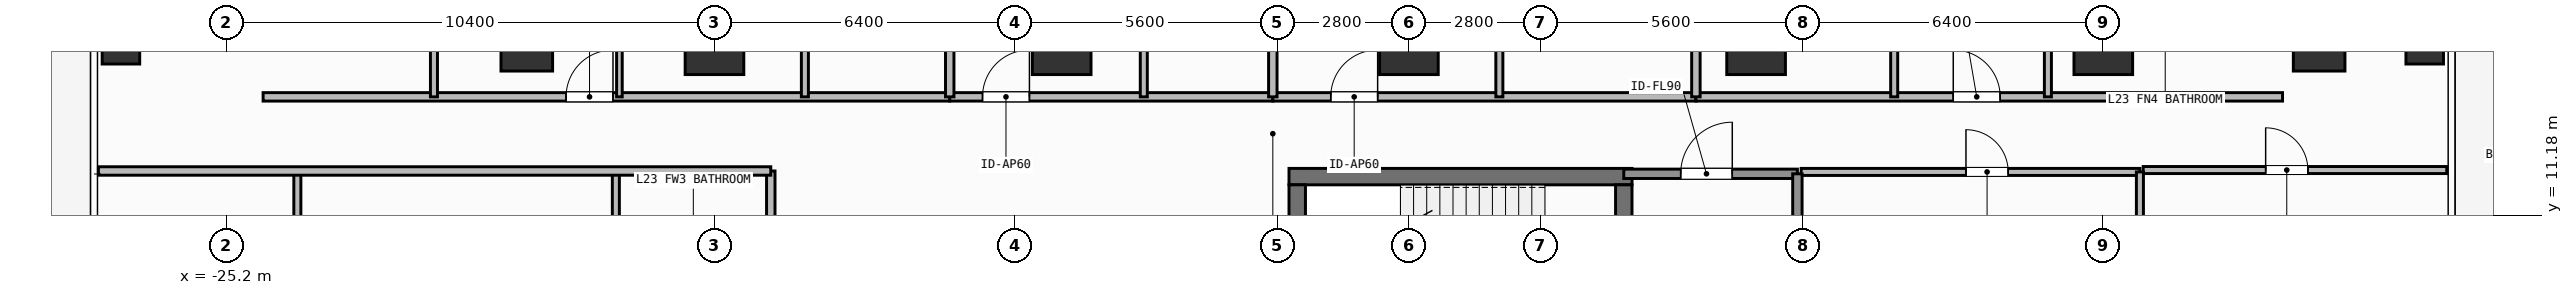
"""IFC4 building model, lengths in metres.
Left out: names, types, materials, properties, quantities, classifications, styles, units other than length and angle.
Written with IfcOpenShell. Run it as: python <this file> out.ifc"""

import sys

from ifc_helpers import new_model, si_unit, direction, frame, frame_2d, origin, origin_2d, place, context, subcontext, project, spatial, rectangle, hollow_rectangle, extrude, element, fill, save


model = new_model("IFC4")
c1 = context("Model", 3, precision=1e-05, world=origin(), true_north=direction((0.0, 1.0)))
c2 = subcontext(c1, "Body", "Model", "MODEL_VIEW")
j1 = project(units=[si_unit("LENGTHUNIT", "METRE"), si_unit("PLANEANGLEUNIT", "RADIAN")], contexts=[c1])
p1 = place(None, origin())
s1 = spatial("IfcSite", under=j1, at=p1, CompositionType="ELEMENT")
p2 = place(p1, origin())
s2 = spatial("IfcBuilding", under=s1, at=p2, CompositionType="ELEMENT")
p3 = place(p2, frame((0.0, 0.0, 93.0)))
s3 = spatial("IfcBuildingStorey", under=s2, at=p3, CompositionType="ELEMENT", Elevation=93.0)
p4 = place(p3, frame((-2.555, 12.0, 0.0), z_axis=(0.0, 0.0, 1.0), x_axis=(1.0, 0.0, 0.0)))
e1 = element("IfcWall", 1, at=p4, inside=s3, PredefinedType="SHEAR", context=c2, shape_type="SweptSolid", body=[
    extrude(rectangle(XDim=7.31, YDim=0.35, at=frame_2d((3.655, 0.0))), origin(), (0.0, 0.0, 1.0), 3.9),
])
p5 = place(p3, frame((-2.38, 8.9, 0.0), z_axis=(0.0, 0.0, 1.0), x_axis=(0.0, 1.0, 0.0)))
e2 = element("IfcWall", 2, at=p5, inside=s3, PredefinedType="SHEAR", context=c2, shape_type="SweptSolid", body=[
    extrude(rectangle(XDim=2.925, YDim=0.35, at=frame_2d((1.462, 0.0))), origin(), (0.0, 0.0, 1.0), 3.9),
])
p6 = place(p3, frame((4.58, 11.825, 0.0), z_axis=(0.0, 0.0, 1.0), x_axis=(0.0, -1.0, 0.0)))
e3 = element("IfcWall", 3, at=p6, inside=s3, PredefinedType="SHEAR", context=c2, shape_type="SweptSolid", body=[
    extrude(rectangle(XDim=2.925, YDim=0.35, at=frame_2d((1.462, 0.0))), origin(), (0.0, 0.0, 1.0), 3.9),
])
p7 = place(p6, frame((0.913, 0.0, 0.0)))
e4 = element("IfcOpeningElement", 4, at=p7, cuts=e3, PredefinedType="OPENING", context=c2, shape_type="SweptSolid", body=[
    extrude(rectangle(XDim=1.1, YDim=2.15, at=frame_2d((0.55, 1.075))), frame((0.0, 0.185, 0.0), z_axis=(0.0, -1.0, 0.0), x_axis=(1.0, 0.0, 0.0)), (0.0, 0.0, 1.0), 0.37),
])
for number, where, z_axis, x_axis in (
    (5, (-14.8, 14.8, 0.0), (0.0, 0.0, 1.0), (1.0, 0.0, 0.0)),
    (6, (-7.4, 14.8, 0.0), (0.0, 0.0, 1.0), (1.0, 0.0, 0.0)),
    (7, (0.0, 14.8, 0.0), (0.0, 0.0, 1.0), (1.0, 0.0, 0.0)),
    (8, (7.4, 14.8, 0.0), (0.0, 0.0, 1.0), (1.0, 0.0, 0.0)),
    (9, (14.8, 14.8, 0.0), (0.0, 0.0, 1.0), (1.0, 0.0, 0.0)),
):
    element("IfcColumn", number, at=place(p3, frame(where, z_axis=z_axis, x_axis=x_axis)), inside=s3, PredefinedType="COLUMN", context=c2, shape_type="SweptSolid", body=[
        extrude(rectangle(XDim=1.25, YDim=1.25, at=origin_2d()), origin(), (0.0, 0.0, 1.0), 3.9),
    ])
for number, where, z_axis, x_axis in (
    (10, (-18.8, 14.8, 0.0), (0.0, 0.0, 1.0), (1.0, 0.0, 0.0)),
    (11, (19.4, 14.8, 0.0), (0.0, 0.0, 1.0), (1.0, 0.0, 0.0)),
):
    element("IfcColumn", number, at=place(p3, frame(where, z_axis=z_axis, x_axis=x_axis)), inside=s3, PredefinedType="COLUMN", context=c2, shape_type="SweptSolid", body=[
        extrude(rectangle(XDim=1.1, YDim=1.1, at=origin_2d()), origin(), (0.0, 0.0, 1.0), 3.9),
    ])
for number, where, z_axis, x_axis in (
    (12, (-27.45, 14.8, 0.0), (0.0, 0.0, 1.0), (1.0, 0.0, 0.0)),
    (13, (21.65, 14.8, 0.0), (0.0, 0.0, 1.0), (1.0, 0.0, 0.0)),
):
    element("IfcColumn", number, at=place(p3, frame(where, z_axis=z_axis, x_axis=x_axis)), inside=s3, PredefinedType="COLUMN", context=c2, shape_type="SweptSolid", body=[
        extrude(hollow_rectangle(XDim=0.8, YDim=0.8, WallThickness=0.036, at=origin_2d()), origin(), (0.0, 0.0, 1.0), 3.9),
    ])
p8 = place(p3, frame((4.58, 12.06, 0.0), z_axis=(0.0, 0.0, 1.0), x_axis=(1.0, 0.0, 0.0)))
e14 = element("IfcWall", 14, at=p8, inside=s3, PredefinedType="SOLIDWALL", context=c2, shape_type="SweptSolid", body=[
    extrude(rectangle(XDim=3.7, YDim=0.2, at=frame_2d((1.85, 0.0))), origin(), (0.0, 0.0, 1.0), 3.68),
])
p9 = place(p8, frame((1.212, 0.0, 0.0)))
e15 = element("IfcOpeningElement", 15, at=p9, cuts=e14, PredefinedType="OPENING", context=c2, shape_type="SweptSolid", body=[
    extrude(rectangle(XDim=1.1, YDim=2.15, at=frame_2d((0.55, 1.075))), frame((0.0, 0.11, 0.0), z_axis=(0.0, -1.0, 0.0), x_axis=(1.0, 0.0, 0.0)), (0.0, 0.0, 1.0), 0.22),
])
p10 = place(p3, frame((8.36, 12.1, 0.0), z_axis=(0.0, 0.0, 1.0), x_axis=(1.0, 0.0, 0.0)))
e16 = element("IfcWall", 16, at=p10, inside=s3, PredefinedType="PARTITIONING", context=c2, shape_type="SweptSolid", body=[
    extrude(rectangle(XDim=7.22, YDim=0.15, at=frame_2d((3.61, 0.0))), origin(), (0.0, 0.0, 1.0), 3.68),
])
p11 = place(p10, frame((3.513, 0.0, 0.0)))
e17 = element("IfcOpeningElement", 17, at=p11, cuts=e16, PredefinedType="OPENING", context=c2, shape_type="SweptSolid", body=[
    extrude(rectangle(XDim=0.9, YDim=2.1, at=frame_2d((0.45, 1.05))), frame((0.0, 0.085, 0.0), z_axis=(0.0, -1.0, 0.0), x_axis=(1.0, 0.0, 0.0)), (0.0, 0.0, 1.0), 0.17),
])
p12 = place(p3, frame((-24.42, 13.7, 0.0), z_axis=(0.0, 0.0, 1.0), x_axis=(1.0, 0.0, 0.0)))
e18 = element("IfcWall", 18, at=p12, inside=s3, PredefinedType="PARTITIONING", context=c2, shape_type="SweptSolid", body=[
    extrude(rectangle(XDim=14.634, YDim=0.18, at=frame_2d((7.317, 0.0))), origin(), (0.0, 0.0, 1.0), 3.68),
])
p13 = place(p12, frame((6.457, 0.0, 0.0)))
e19 = element("IfcOpeningElement", 19, at=p13, cuts=e18, PredefinedType="OPENING", context=c2, shape_type="SweptSolid", body=[
    extrude(rectangle(XDim=1.0, YDim=2.2, at=frame_2d((0.5, 1.1))), frame((0.0, 0.1, 0.0), z_axis=(0.0, -1.0, 0.0), x_axis=(1.0, 0.0, 0.0)), (0.0, 0.0, 1.0), 0.2),
])
p14 = place(p3, frame((-16.826, 13.7, 0.0), z_axis=(0.0, 0.0, 1.0), x_axis=(0.0, 1.0, 0.0)))
e20 = element("IfcWall", 20, at=p14, inside=s3, PredefinedType="PARTITIONING", context=c2, shape_type="SweptSolid", body=[
    extrude(rectangle(XDim=12.89, YDim=0.12, at=frame_2d((6.445, 0.0))), origin(), (0.0, 0.0, 1.0), 3.68),
])
p15 = place(p14, frame((5.905, 0.0, 0.0)))
e21 = element("IfcOpeningElement", 21, at=p15, cuts=e20, PredefinedType="OPENING", context=c2, shape_type="SweptSolid", body=[
    extrude(rectangle(XDim=0.9, YDim=2.1, at=frame_2d((0.45, 1.05))), frame((0.0, 0.07, 0.0), z_axis=(0.0, -1.0, 0.0), x_axis=(1.0, 0.0, 0.0)), (0.0, 0.0, 1.0), 0.14),
])
p16 = place(p3, frame((-20.779, 13.7, 0.0), z_axis=(0.0, 0.0, 1.0), x_axis=(0.0, 1.0, 0.0)))
e22 = element("IfcWall", 22, at=p16, inside=s3, PredefinedType="PARTITIONING", context=c2, shape_type="SweptSolid", body=[
    extrude(rectangle(XDim=7.476, YDim=0.15, at=frame_2d((3.738, 0.0))), origin(), (0.0, 0.0, 1.0), 3.68),
])
p17 = place(p16, frame((3.313, 0.0, 0.0)))
e23 = element("IfcOpeningElement", 23, at=p17, cuts=e22, PredefinedType="OPENING", context=c2, shape_type="SweptSolid", body=[
    extrude(rectangle(XDim=0.85, YDim=2.1, at=frame_2d((0.425, 1.05))), frame((0.0, 0.085, 0.0), z_axis=(0.0, -1.0, 0.0), x_axis=(1.0, 0.0, 0.0)), (0.0, 0.0, 1.0), 0.17),
])
p18 = place(p3, frame((-12.873, 13.7, 0.0), z_axis=(0.0, 0.0, 1.0), x_axis=(0.0, 1.0, 0.0)))
e24 = element("IfcWall", 24, at=p18, inside=s3, PredefinedType="PARTITIONING", context=c2, shape_type="SweptSolid", body=[
    extrude(rectangle(XDim=9.023, YDim=0.15, at=frame_2d((4.511, 0.0))), origin(), (0.0, 0.0, 1.0), 3.68),
])
p19 = place(p18, frame((4.086, 0.0, 0.0)))
e25 = element("IfcOpeningElement", 25, at=p19, cuts=e24, PredefinedType="OPENING", context=c2, shape_type="SweptSolid", body=[
    extrude(rectangle(XDim=0.85, YDim=2.1, at=frame_2d((0.425, 1.05))), frame((0.0, 0.085, 0.0), z_axis=(0.0, -1.0, 0.0), x_axis=(1.0, 0.0, 0.0)), (0.0, 0.0, 1.0), 0.17),
])
p20 = place(p3, frame((-9.786, 13.7, 0.0), z_axis=(0.0, 0.0, 1.0), x_axis=(1.0, 0.0, 0.0)))
e26 = element("IfcWall", 26, at=p20, inside=s3, PredefinedType="PARTITIONING", context=c2, shape_type="SweptSolid", body=[
    extrude(rectangle(XDim=6.886, YDim=0.18, at=frame_2d((3.443, 0.0))), origin(), (0.0, 0.0, 1.0), 3.68),
])
p21 = place(p20, frame((0.698, 0.0, 0.0)))
e27 = element("IfcOpeningElement", 27, at=p21, cuts=e26, PredefinedType="OPENING", context=c2, shape_type="SweptSolid", body=[
    extrude(rectangle(XDim=1.0, YDim=2.2, at=frame_2d((0.5, 1.1))), frame((0.0, 0.1, 0.0), z_axis=(0.0, -1.0, 0.0), x_axis=(1.0, 0.0, 0.0)), (0.0, 0.0, 1.0), 0.2),
])
p22 = place(p3, frame((-5.65, 13.7, 0.0), z_axis=(0.0, 0.0, 1.0), x_axis=(0.0, 1.0, 0.0)))
e28 = element("IfcWall", 28, at=p22, inside=s3, PredefinedType="PARTITIONING", context=c2, shape_type="SweptSolid", body=[
    extrude(rectangle(XDim=7.09, YDim=0.15, at=frame_2d((3.545, 0.0))), origin(), (0.0, 0.0, 1.0), 3.68),
])
p23 = place(p22, frame((3.03, 0.0, 0.0)))
e29 = element("IfcOpeningElement", 29, at=p23, cuts=e28, PredefinedType="OPENING", context=c2, shape_type="SweptSolid", body=[
    extrude(rectangle(XDim=0.85, YDim=2.1, at=frame_2d((0.425, 1.05))), frame((0.0, 0.085, 0.0), z_axis=(0.0, -1.0, 0.0), x_axis=(1.0, 0.0, 0.0)), (0.0, 0.0, 1.0), 0.17),
])
p24 = place(p3, frame((-2.9, 13.7, 0.0), z_axis=(0.0, 0.0, 1.0), x_axis=(1.0, 0.0, 0.0)))
e30 = element("IfcWall", 30, at=p24, inside=s3, PredefinedType="PARTITIONING", context=c2, shape_type="SweptSolid", body=[
    extrude(rectangle(XDim=9.017, YDim=0.18, at=frame_2d((4.508, 0.0))), origin(), (0.0, 0.0, 1.0), 3.68),
])
p25 = place(p24, frame((1.234, 0.0, 0.0)))
e31 = element("IfcOpeningElement", 31, at=p25, cuts=e30, PredefinedType="OPENING", context=c2, shape_type="SweptSolid", body=[
    extrude(rectangle(XDim=1.0, YDim=2.2, at=frame_2d((0.5, 1.1))), frame((0.0, 0.1, 0.0), z_axis=(0.0, -1.0, 0.0), x_axis=(1.0, 0.0, 0.0)), (0.0, 0.0, 1.0), 0.2),
])
p26 = place(p3, frame((1.928, 13.7, 0.0), z_axis=(0.0, 0.0, 1.0), x_axis=(0.0, 1.0, 0.0)))
e32 = element("IfcWall", 32, at=p26, inside=s3, PredefinedType="PARTITIONING", context=c2, shape_type="SweptSolid", body=[
    extrude(rectangle(XDim=8.474, YDim=0.15, at=frame_2d((4.237, 0.0))), origin(), (0.0, 0.0, 1.0), 3.68),
])
p27 = place(p26, frame((3.723, 0.0, 0.0)))
e33 = element("IfcOpeningElement", 33, at=p27, cuts=e32, PredefinedType="OPENING", context=c2, shape_type="SweptSolid", body=[
    extrude(rectangle(XDim=0.85, YDim=2.1, at=frame_2d((0.425, 1.05))), frame((0.0, 0.085, 0.0), z_axis=(0.0, -1.0, 0.0), x_axis=(1.0, 0.0, 0.0)), (0.0, 0.0, 1.0), 0.17),
])
p28 = place(p3, frame((6.117, 13.7, 0.0), z_axis=(0.0, 0.0, 1.0), x_axis=(1.0, 0.0, 0.0)))
e34 = element("IfcWall", 34, at=p28, inside=s3, PredefinedType="PARTITIONING", context=c2, shape_type="SweptSolid", body=[
    extrude(rectangle(XDim=12.503, YDim=0.18, at=frame_2d((6.251, 0.0))), origin(), (0.0, 0.0, 1.0), 3.68),
])
p29 = place(p28, frame((5.485, 0.0, 0.0)))
e35 = element("IfcOpeningElement", 35, at=p29, cuts=e34, PredefinedType="OPENING", context=c2, shape_type="SweptSolid", body=[
    extrude(rectangle(XDim=1.0, YDim=2.2, at=frame_2d((0.5, 1.1))), frame((0.0, 0.1, 0.0), z_axis=(0.0, -1.0, 0.0), x_axis=(1.0, 0.0, 0.0)), (0.0, 0.0, 1.0), 0.2),
])
p30 = place(p3, frame((10.343, 13.7, 0.0), z_axis=(0.0, 0.0, 1.0), x_axis=(0.0, 1.0, 0.0)))
e36 = element("IfcWall", 36, at=p30, inside=s3, PredefinedType="PARTITIONING", context=c2, shape_type="SweptSolid", body=[
    extrude(rectangle(XDim=8.045, YDim=0.15, at=frame_2d((4.022, 0.0))), origin(), (0.0, 0.0, 1.0), 3.68),
])
p31 = place(p30, frame((3.51, 0.0, 0.0)))
e37 = element("IfcOpeningElement", 37, at=p31, cuts=e36, PredefinedType="OPENING", context=c2, shape_type="SweptSolid", body=[
    extrude(rectangle(XDim=0.85, YDim=2.1, at=frame_2d((0.425, 1.05))), frame((0.0, 0.085, 0.0), z_axis=(0.0, -1.0, 0.0), x_axis=(1.0, 0.0, 0.0)), (0.0, 0.0, 1.0), 0.17),
])
p32 = place(p3, frame((13.619, 13.7, 0.0), z_axis=(0.0, 0.0, 1.0), x_axis=(0.0, 1.0, 0.0)))
e38 = element("IfcWall", 38, at=p32, inside=s3, PredefinedType="PARTITIONING", context=c2, shape_type="SweptSolid", body=[
    extrude(rectangle(XDim=3.48, YDim=0.15, at=frame_2d((1.74, 0.0))), origin(), (0.0, 0.0, 1.0), 3.68),
])
p33 = place(p32, frame((1.937, 0.0, 0.0)))
e39 = element("IfcOpeningElement", 39, at=p33, cuts=e38, PredefinedType="OPENING", context=c2, shape_type="SweptSolid", body=[
    extrude(rectangle(XDim=0.85, YDim=2.1, at=frame_2d((0.425, 1.05))), frame((0.0, 0.085, 0.0), z_axis=(0.0, -1.0, 0.0), x_axis=(1.0, 0.0, 0.0)), (0.0, 0.0, 1.0), 0.17),
])
p34 = place(p3, frame((-13.6, 4.04, 0.0), z_axis=(0.0, 0.0, 1.0), x_axis=(0.0, 1.0, 0.0)))
e40 = element("IfcWall", 40, at=p34, inside=s3, PredefinedType="PARTITIONING", context=c2, shape_type="SweptSolid", body=[
    extrude(rectangle(XDim=8.08, YDim=0.18, at=frame_2d((4.04, 0.0))), origin(), (0.0, 0.0, 1.0), 3.68),
])
p35 = place(p34, frame((1.583, 0.0, 0.0)))
e41 = element("IfcOpeningElement", 41, at=p35, cuts=e40, PredefinedType="OPENING", context=c2, shape_type="SweptSolid", body=[
    extrude(rectangle(XDim=1.0, YDim=2.2, at=frame_2d((0.5, 1.1))), frame((0.0, 0.1, 0.0), z_axis=(0.0, -1.0, 0.0), x_axis=(1.0, 0.0, 0.0)), (0.0, 0.0, 1.0), 0.2),
])
p36 = place(p3, frame((15.65, 12.14, 0.0), z_axis=(0.0, 0.0, 1.0), x_axis=(1.0, 0.0, 0.0)))
e42 = element("IfcWall", 42, at=p36, inside=s3, PredefinedType="PARTITIONING", context=c2, shape_type="SweptSolid", body=[
    extrude(rectangle(XDim=6.47, YDim=0.15, at=frame_2d((3.235, 0.0))), origin(), (0.0, 0.0, 1.0), 3.68),
])
p37 = place(p36, frame((2.61, 0.0, 0.0)))
e43 = element("IfcOpeningElement", 43, at=p37, cuts=e42, PredefinedType="OPENING", context=c2, shape_type="SweptSolid", body=[
    extrude(rectangle(XDim=0.9, YDim=2.1, at=frame_2d((0.45, 1.05))), frame((0.0, 0.085, 0.0), z_axis=(0.0, -1.0, 0.0), x_axis=(1.0, 0.0, 0.0)), (0.0, 0.0, 1.0), 0.17),
])
p38 = place(p3, frame((8.28, 8.875, 0.0), z_axis=(0.0, 0.0, 1.0), x_axis=(0.0, 1.0, 0.0)))
e44 = element("IfcWall", 44, at=p38, inside=s3, PredefinedType="SOLIDWALL", context=c2, shape_type="SweptSolid", body=[
    extrude(rectangle(XDim=3.185, YDim=0.2, at=frame_2d((1.593, 0.0))), origin(), (0.0, 0.0, 1.0), 3.68),
])
p39 = place(p3, frame((15.58, 5.85, 0.0), z_axis=(0.0, 0.0, 1.0), x_axis=(0.0, 1.0, 0.0)))
e45 = element("IfcWall", 45, at=p39, inside=s3, PredefinedType="PARTITIONING", context=c2, shape_type="SweptSolid", body=[
    extrude(rectangle(XDim=6.25, YDim=0.15, at=frame_2d((3.125, 0.0))), origin(), (0.0, 0.0, 1.0), 3.68),
])
for number, where, z_axis, x_axis in (
    (46, (-9.786, 13.7, 0.0), (0.0, 0.0, 1.0), (0.0, 1.0, 0.0)),
    (47, (-2.9, 13.7, 0.0), (0.0, 0.0, 1.0), (0.0, 1.0, 0.0)),
    (48, (6.117, 13.7, 0.0), (0.0, 0.0, 1.0), (0.0, 1.0, 0.0)),
):
    element("IfcWall", number, at=place(p3, frame(where, z_axis=z_axis, x_axis=x_axis)), inside=s3, PredefinedType="PARTITIONING", context=c2, shape_type="SweptSolid", body=[
        extrude(rectangle(XDim=17.13, YDim=0.18, at=frame_2d((8.565, 0.0))), origin(), (0.0, 0.0, 1.0), 3.68),
    ])
for number, where, z_axis, x_axis in (
    (49, (-16.902, 9.32, 0.0), (0.0, 0.0, 1.0), (0.0, 1.0, 0.0)),
    (50, (-23.69, 9.32, 0.0), (0.0, 0.0, 1.0), (0.0, 1.0, 0.0)),
):
    element("IfcWall", number, at=place(p3, frame(where, z_axis=z_axis, x_axis=x_axis)), inside=s3, PredefinedType="PARTITIONING", context=c2, shape_type="SweptSolid", body=[
        extrude(rectangle(XDim=2.8, YDim=0.15, at=frame_2d((1.4, 0.0))), origin(), (0.0, 0.0, 1.0), 3.68),
    ])
p40 = place(p3, frame((-27.93, 12.12, 0.0), z_axis=(0.0, 0.0, 1.0), x_axis=(1.0, 0.0, 0.0)))
e51 = element("IfcWall", 51, at=p40, inside=s3, PredefinedType="PARTITIONING", context=c2, shape_type="SweptSolid", body=[
    extrude(rectangle(XDim=14.33, YDim=0.18, at=frame_2d((7.165, 0.0))), origin(), (0.0, 0.0, 1.0), 3.68),
])
p41 = place(p9, origin())
e52 = element("IfcDoor", 52, at=p41, inside=s3, OperationType="SINGLE_SWING_RIGHT", PredefinedType="DOOR", context=c2, shape_type="SweptSolid", body=[
    extrude(rectangle(XDim=1.1, YDim=2.15, at=frame_2d((0.55, 1.075))), frame((0.0, 0.025, 0.0), z_axis=(0.0, -1.0, 0.0), x_axis=(1.0, 0.0, 0.0)), (0.0, 0.0, 1.0), 0.05),
])
fill(e15, e52)
p42 = place(p11, origin())
e53 = element("IfcDoor", 53, at=p42, inside=s3, OperationType="SINGLE_SWING_LEFT", PredefinedType="DOOR", context=c2, shape_type="SweptSolid", body=[
    extrude(rectangle(XDim=0.9, YDim=2.1, at=frame_2d((0.45, 1.05))), frame((0.0, 0.025, 0.0), z_axis=(0.0, -1.0, 0.0), x_axis=(1.0, 0.0, 0.0)), (0.0, 0.0, 1.0), 0.05),
])
fill(e17, e53)
p43 = place(p13, origin())
e54 = element("IfcDoor", 54, at=p43, inside=s3, OperationType="SINGLE_SWING_RIGHT", PredefinedType="DOOR", context=c2, shape_type="SweptSolid", body=[
    extrude(rectangle(XDim=1.0, YDim=2.2, at=frame_2d((0.5, 1.1))), frame((0.0, 0.025, 0.0), z_axis=(0.0, -1.0, 0.0), x_axis=(1.0, 0.0, 0.0)), (0.0, 0.0, 1.0), 0.05),
])
fill(e19, e54)
p44 = place(p21, origin())
e55 = element("IfcDoor", 55, at=p44, inside=s3, OperationType="SINGLE_SWING_RIGHT", PredefinedType="DOOR", context=c2, shape_type="SweptSolid", body=[
    extrude(rectangle(XDim=1.0, YDim=2.2, at=frame_2d((0.5, 1.1))), frame((0.0, 0.025, 0.0), z_axis=(0.0, -1.0, 0.0), x_axis=(1.0, 0.0, 0.0)), (0.0, 0.0, 1.0), 0.05),
])
fill(e27, e55)
p45 = place(p25, origin())
e56 = element("IfcDoor", 56, at=p45, inside=s3, OperationType="SINGLE_SWING_RIGHT", PredefinedType="DOOR", context=c2, shape_type="SweptSolid", body=[
    extrude(rectangle(XDim=1.0, YDim=2.2, at=frame_2d((0.5, 1.1))), frame((0.0, 0.025, 0.0), z_axis=(0.0, -1.0, 0.0), x_axis=(1.0, 0.0, 0.0)), (0.0, 0.0, 1.0), 0.05),
])
fill(e31, e56)
p46 = place(p29, origin())
e57 = element("IfcDoor", 57, at=p46, inside=s3, OperationType="SINGLE_SWING_LEFT", PredefinedType="DOOR", context=c2, shape_type="SweptSolid", body=[
    extrude(rectangle(XDim=1.0, YDim=2.2, at=frame_2d((0.5, 1.1))), frame((0.0, 0.025, 0.0), z_axis=(0.0, -1.0, 0.0), x_axis=(1.0, 0.0, 0.0)), (0.0, 0.0, 1.0), 0.05),
])
fill(e35, e57)
p47 = place(p37, origin())
e58 = element("IfcDoor", 58, at=p47, inside=s3, OperationType="SINGLE_SWING_LEFT", PredefinedType="DOOR", context=c2, shape_type="SweptSolid", body=[
    extrude(rectangle(XDim=0.9, YDim=2.1, at=frame_2d((0.45, 1.05))), frame((0.0, 0.025, 0.0), z_axis=(0.0, -1.0, 0.0), x_axis=(1.0, 0.0, 0.0)), (0.0, 0.0, 1.0), 0.05),
])
fill(e43, e58)
save(model, sys.argv[1])
